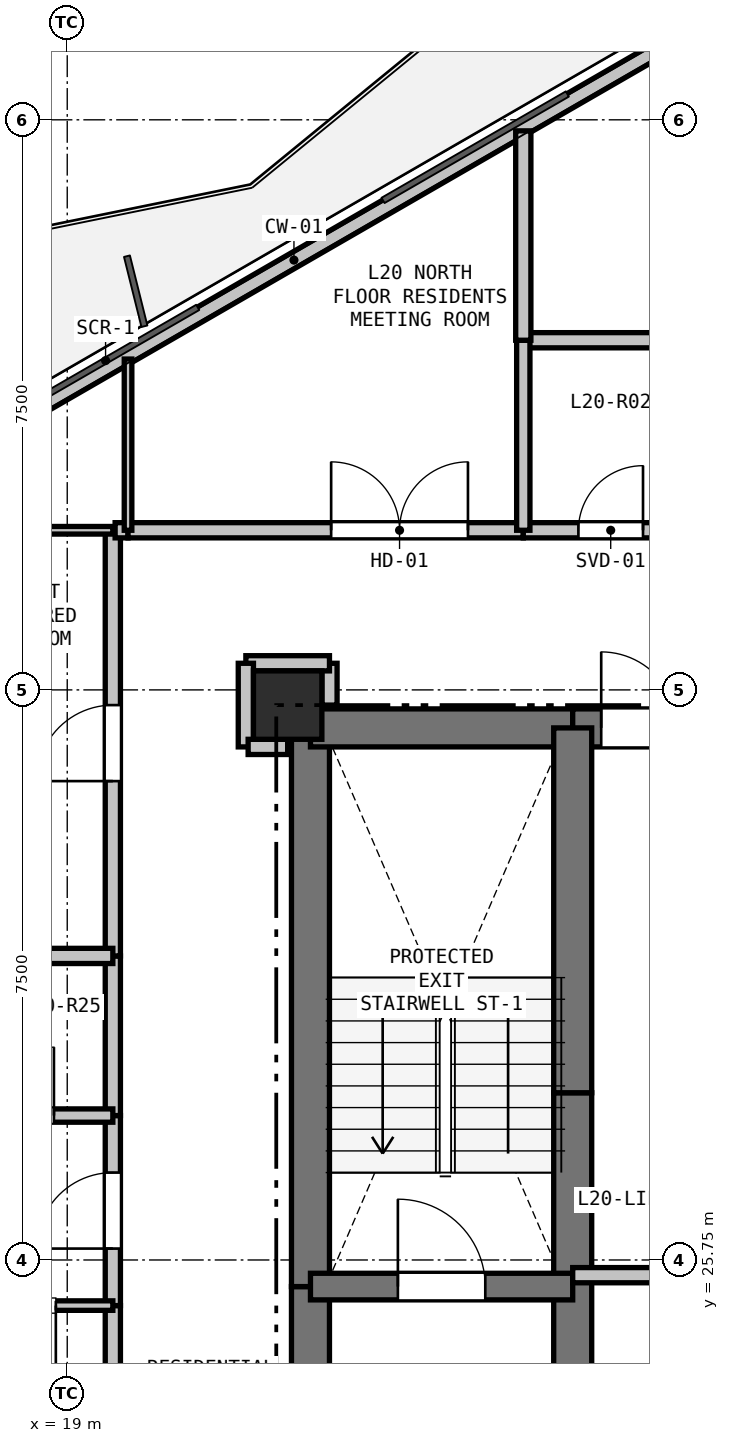
"""IFC4 building model, lengths in metres.
Left out: names, types, materials, properties, quantities, classifications, styles, units other than length and angle.
Written with IfcOpenShell. Run it as: python <this file> out.ifc"""

import sys

from ifc_helpers import new_model, si_unit, direction, frame, frame_2d, origin, origin_2d, place, context, subcontext, project, spatial, rectangle, extrude, element, fill, save


model = new_model("IFC4")
c1 = context("Model", 3, precision=1e-05, world=origin(), true_north=direction((0.0, 1.0)))
c2 = subcontext(c1, "Body", "Model", "MODEL_VIEW")
j1 = project(units=[si_unit("LENGTHUNIT", "METRE"), si_unit("PLANEANGLEUNIT", "RADIAN")], contexts=[c1])
p1 = place(None, origin())
s1 = spatial("IfcSite", under=j1, at=p1, CompositionType="ELEMENT")
p2 = place(p1, origin())
s2 = spatial("IfcBuilding", under=s1, at=p2, CompositionType="ELEMENT")
p3 = place(p2, frame((0.0, 0.0, 76.8)))
s3 = spatial("IfcBuildingStorey", under=s2, at=p3, CompositionType="ELEMENT", Elevation=76.8)
p4 = place(p3, frame((21.9, 33.05, 0.0), z_axis=(0.0, 0.0, 1.0), x_axis=(1.0, 0.0, 0.0)))
e1 = element("IfcColumn", 1, at=p4, inside=s3, PredefinedType="COLUMN", context=c2, shape_type="SweptSolid", body=[
    extrude(rectangle(XDim=0.9, YDim=0.9, at=origin_2d()), origin(), (0.0, 0.0, 1.0), 3.3),
])
p5 = place(p3, frame((17.12, 36.097, 0.0), z_axis=(0.0, 0.0, 1.0), x_axis=(0.866027010039, 0.499997217876, 0.0)))
e2 = element("IfcWall", 2, at=p5, inside=s3, PredefinedType="PARAPET", context=c2, shape_type="SweptSolid", body=[
    extrude(rectangle(XDim=11.229, YDim=0.2, at=frame_2d((5.615, 0.0))), origin(), (0.0, 0.0, 1.0), 0.2),
])
p6 = place(p3, frame((22.2, 20.75, 0.0), z_axis=(0.0, 0.0, 1.0), x_axis=(0.0, 1.0, 0.0)))
e3 = element("IfcWall", 3, at=p6, inside=s3, PredefinedType="SHEAR", context=c2, shape_type="SweptSolid", body=[
    extrude(rectangle(XDim=4.65, YDim=0.5, at=frame_2d((2.325, 0.0))), origin(), (0.0, 0.0, 1.0), 3.05),
])
p7 = place(p3, frame((22.2, 25.4, 0.0), z_axis=(0.0, 0.0, 1.0), x_axis=(0.0, 1.0, 0.0)))
e4 = element("IfcWall", 4, at=p7, inside=s3, PredefinedType="SHEAR", context=c2, shape_type="SweptSolid", body=[
    extrude(rectangle(XDim=7.35, YDim=0.5, at=frame_2d((3.675, 0.0))), origin(), (0.0, 0.0, 1.0), 3.05),
])
p8 = place(p3, frame((22.2, 32.75, 0.0), z_axis=(0.0, 0.0, 1.0), x_axis=(1.0, 0.0, 0.0)))
e5 = element("IfcWall", 5, at=p8, inside=s3, PredefinedType="SHEAR", context=c2, shape_type="SweptSolid", body=[
    extrude(rectangle(XDim=3.45, YDim=0.5, at=frame_2d((1.725, 0.0))), origin(), (0.0, 0.0, 1.0), 3.05),
])
p9 = place(p3, frame((25.65, 32.75, 0.0), z_axis=(0.0, 0.0, 1.0), x_axis=(1.0, 0.0, 0.0)))
e6 = element("IfcWall", 6, at=p9, inside=s3, PredefinedType="SHEAR", context=c2, shape_type="SweptSolid", body=[
    extrude(rectangle(XDim=1.75, YDim=0.5, at=frame_2d((0.875, 0.0))), origin(), (0.0, 0.0, 1.0), 3.05),
])
p10 = place(p9, frame((0.375, 0.0, 0.0)))
e7 = element("IfcOpeningElement", 7, at=p10, cuts=e6, PredefinedType="OPENING", context=c2, shape_type="SweptSolid", body=[
    extrude(rectangle(XDim=1.0, YDim=2.15, at=frame_2d((0.5, 1.075))), frame((0.0, 0.26, 0.0), z_axis=(0.0, -1.0, 0.0), x_axis=(1.0, 0.0, 0.0)), (0.0, 0.0, 1.0), 0.52),
])
p11 = place(p3, frame((25.65, 22.75, 0.0), z_axis=(0.0, 0.0, 1.0), x_axis=(0.0, 1.0, 0.0)))
e8 = element("IfcWall", 8, at=p11, inside=s3, PredefinedType="SHEAR", context=c2, shape_type="SweptSolid", body=[
    extrude(rectangle(XDim=2.8, YDim=0.5, at=frame_2d((1.4, 0.0))), origin(), (0.0, 0.0, 1.0), 3.05),
])
p12 = place(p3, frame((25.65, 25.55, 0.0), z_axis=(0.0, 0.0, 1.0), x_axis=(0.0, 1.0, 0.0)))
e9 = element("IfcWall", 9, at=p12, inside=s3, PredefinedType="SHEAR", context=c2, shape_type="SweptSolid", body=[
    extrude(rectangle(XDim=2.4, YDim=0.5, at=frame_2d((1.2, 0.0))), origin(), (0.0, 0.0, 1.0), 3.05),
])
p13 = place(p3, frame((25.65, 27.95, 0.0), z_axis=(0.0, 0.0, 1.0), x_axis=(0.0, 1.0, 0.0)))
e10 = element("IfcWall", 10, at=p13, inside=s3, PredefinedType="SHEAR", context=c2, shape_type="SweptSolid", body=[
    extrude(rectangle(XDim=4.8, YDim=0.5, at=frame_2d((2.4, 0.0))), origin(), (0.0, 0.0, 1.0), 3.05),
])
p14 = place(p3, frame((22.2, 25.4, 0.0), z_axis=(0.0, 0.0, 1.0), x_axis=(1.0, 0.0, 0.0)))
e11 = element("IfcWall", 11, at=p14, inside=s3, PredefinedType="SHEAR", context=c2, shape_type="SweptSolid", body=[
    extrude(rectangle(XDim=3.45, YDim=0.35, at=frame_2d((1.725, 0.0))), origin(), (0.0, 0.0, 1.0), 3.05),
])
p15 = place(p14, frame((1.15, 0.0, 0.0)))
e12 = element("IfcOpeningElement", 12, at=p15, cuts=e11, PredefinedType="OPENING", context=c2, shape_type="SweptSolid", body=[
    extrude(rectangle(XDim=1.15, YDim=2.15, at=frame_2d((0.575, 1.075))), frame((0.0, 0.185, 0.0), z_axis=(0.0, -1.0, 0.0), x_axis=(1.0, 0.0, 0.0)), (0.0, 0.0, 1.0), 0.37),
])
p16 = place(p3, frame((25.65, 25.55, 0.0), z_axis=(0.0, 0.0, 1.0), x_axis=(1.0, 0.0, 0.0)))
e13 = element("IfcWall", 13, at=p16, inside=s3, PredefinedType="PARTITIONING", context=c2, shape_type="SweptSolid", body=[
    extrude(rectangle(XDim=4.95, YDim=0.2, at=frame_2d((2.475, 0.0))), origin(), (0.0, 0.0, 1.0), 3.05),
])
p17 = place(p3, frame((19.6, 21.15, 0.0), z_axis=(0.0, 0.0, 1.0), x_axis=(0.0, 1.0, 0.0)))
e14 = element("IfcWall", 14, at=p17, inside=s3, PredefinedType="PARTITIONING", context=c2, shape_type="SweptSolid", body=[
    extrude(rectangle(XDim=4.0, YDim=0.2, at=frame_2d((2.0, 0.0))), origin(), (0.0, 0.0, 1.0), 2.423),
])
p18 = place(p3, frame((19.6, 25.15, 0.0), z_axis=(0.0, 0.0, 1.0), x_axis=(0.0, 1.0, 0.0)))
e15 = element("IfcWall", 15, at=p18, inside=s3, PredefinedType="PARTITIONING", context=c2, shape_type="SweptSolid", body=[
    extrude(rectangle(XDim=2.5, YDim=0.2, at=frame_2d((1.25, 0.0))), origin(), (0.0, 0.0, 1.0), 3.05),
])
p19 = place(p18, frame((0.75, 0.0, 0.0)))
e16 = element("IfcOpeningElement", 16, at=p19, cuts=e15, PredefinedType="OPENING", context=c2, shape_type="SweptSolid", body=[
    extrude(rectangle(XDim=1.0, YDim=2.15, at=frame_2d((0.5, 1.075))), frame((0.0, 0.11, 0.0), z_axis=(0.0, -1.0, 0.0), x_axis=(1.0, 0.0, 0.0)), (0.0, 0.0, 1.0), 0.22),
])
p20 = place(p3, frame((19.6, 27.65, 0.0), z_axis=(0.0, 0.0, 1.0), x_axis=(0.0, 1.0, 0.0)))
e17 = element("IfcWall", 17, at=p20, inside=s3, PredefinedType="PARTITIONING", context=c2, shape_type="SweptSolid", body=[
    extrude(rectangle(XDim=2.1, YDim=0.2, at=frame_2d((1.05, 0.0))), origin(), (0.0, 0.0, 1.0), 3.05),
])
p21 = place(p3, frame((19.6, 29.75, 0.0), z_axis=(0.0, 0.0, 1.0), x_axis=(0.0, 1.0, 0.0)))
e18 = element("IfcWall", 18, at=p21, inside=s3, PredefinedType="PARTITIONING", context=c2, shape_type="SweptSolid", body=[
    extrude(rectangle(XDim=5.6, YDim=0.2, at=frame_2d((2.8, 0.0))), origin(), (0.0, 0.0, 1.0), 2.423),
])
p22 = place(p21, frame((2.3, 0.0, 0.0)))
e19 = element("IfcOpeningElement", 19, at=p22, cuts=e18, PredefinedType="OPENING", context=c2, shape_type="SweptSolid", body=[
    extrude(rectangle(XDim=1.0, YDim=2.15, at=frame_2d((0.5, 1.075))), frame((0.0, 0.11, 0.0), z_axis=(0.0, -1.0, 0.0), x_axis=(1.0, 0.0, 0.0)), (0.0, 0.0, 1.0), 0.22),
])
p23 = place(p3, frame((19.63, 35.35, 0.0), z_axis=(0.0, 0.0, 1.0), x_axis=(1.0, 0.0, 0.0)))
e20 = element("IfcWall", 20, at=p23, inside=s3, PredefinedType="PARTITIONING", context=c2, shape_type="SweptSolid", body=[
    extrude(rectangle(XDim=0.17, YDim=0.2, at=frame_2d((0.085, 0.0))), origin(), (0.0, 0.0, 1.0), 3.05),
])
p24 = place(p3, frame((19.8, 35.35, 0.0), z_axis=(0.0, 0.0, 1.0), x_axis=(1.0, 0.0, 0.0)))
e21 = element("IfcWall", 21, at=p24, inside=s3, PredefinedType="PARTITIONING", context=c2, shape_type="SweptSolid", body=[
    extrude(rectangle(XDim=5.2, YDim=0.2, at=frame_2d((2.6, 0.0))), origin(), (0.0, 0.0, 1.0), 3.05),
])
p25 = place(p24, frame((2.672, 0.0, 0.0)))
e22 = element("IfcOpeningElement", 22, at=p25, cuts=e21, PredefinedType="OPENING", context=c2, shape_type="SweptSolid", body=[
    extrude(rectangle(XDim=1.8, YDim=2.2, at=frame_2d((0.9, 1.1))), frame((0.0, 0.11, 0.0), z_axis=(0.0, -1.0, 0.0), x_axis=(1.0, 0.0, 0.0)), (0.0, 0.0, 1.0), 0.22),
])
p26 = place(p3, frame((25.0, 35.35, 0.0), z_axis=(0.0, 0.0, 1.0), x_axis=(1.0, 0.0, 0.0)))
e23 = element("IfcWall", 23, at=p26, inside=s3, PredefinedType="PARTITIONING", context=c2, shape_type="SweptSolid", body=[
    extrude(rectangle(XDim=2.3, YDim=0.2, at=frame_2d((1.15, 0.0))), origin(), (0.0, 0.0, 1.0), 3.05),
])
p27 = place(p26, frame((0.725, 0.0, 0.0)))
e24 = element("IfcOpeningElement", 24, at=p27, cuts=e23, PredefinedType="OPENING", context=c2, shape_type="SweptSolid", body=[
    extrude(rectangle(XDim=0.85, YDim=2.1, at=frame_2d((0.425, 1.05))), frame((0.0, 0.11, 0.0), z_axis=(0.0, -1.0, 0.0), x_axis=(1.0, 0.0, 0.0)), (0.0, 0.0, 1.0), 0.22),
])
p28 = place(p3, frame((22.45, 33.05, 0.0), z_axis=(0.0, 0.0, 1.0), x_axis=(0.0, 1.0, 0.0)))
e25 = element("IfcWall", 25, at=p28, inside=s3, PredefinedType="PARTITIONING", context=c2, shape_type="SweptSolid", body=[
    extrude(rectangle(XDim=0.55, YDim=0.2, at=frame_2d((0.275, 0.0))), origin(), (0.0, 0.0, 1.0), 2.498),
])
p29 = place(p3, frame((22.45, 33.6, 0.0), z_axis=(0.0, 0.0, 1.0), x_axis=(-1.0, 0.0, 0.0)))
e26 = element("IfcWall", 26, at=p29, inside=s3, PredefinedType="PARTITIONING", context=c2, shape_type="SweptSolid", body=[
    extrude(rectangle(XDim=1.1, YDim=0.2, at=frame_2d((0.55, 0.0))), origin(), (0.0, 0.0, 1.0), 3.05),
])
p30 = place(p3, frame((21.35, 33.6, 0.0), z_axis=(0.0, 0.0, 1.0), x_axis=(0.0, -1.0, 0.0)))
e27 = element("IfcWall", 27, at=p30, inside=s3, PredefinedType="PARTITIONING", context=c2, shape_type="SweptSolid", body=[
    extrude(rectangle(XDim=1.1, YDim=0.2, at=frame_2d((0.55, 0.0))), origin(), (0.0, 0.0, 1.0), 2.423),
])
p31 = place(p3, frame((21.38, 32.5, 0.0), z_axis=(0.0, 0.0, 1.0), x_axis=(1.0, 0.0, 0.0)))
e28 = element("IfcWall", 28, at=p31, inside=s3, PredefinedType="PARTITIONING", context=c2, shape_type="SweptSolid", body=[
    extrude(rectangle(XDim=0.52, YDim=0.2, at=frame_2d((0.26, 0.0))), origin(), (0.0, 0.0, 1.0), 2.498),
])
p32 = place(p3, frame((17.15, 27.65, 0.0), z_axis=(0.0, 0.0, 1.0), x_axis=(1.0, 0.0, 0.0)))
e29 = element("IfcWall", 29, at=p32, inside=s3, PredefinedType="PLUMBINGWALL", context=c2, shape_type="SweptSolid", body=[
    extrude(rectangle(XDim=2.45, YDim=0.175, at=frame_2d((1.225, 0.0))), origin(), (0.0, 0.0, 1.0), 3.05),
])
p33 = place(p32, frame((0.775, 0.0, 0.0)))
e30 = element("IfcOpeningElement", 30, at=p33, cuts=e29, PredefinedType="OPENING", context=c2, shape_type="SweptSolid", body=[
    extrude(rectangle(XDim=0.9, YDim=2.1, at=frame_2d((0.45, 1.05))), frame((0.0, 0.097, 0.0), z_axis=(0.0, -1.0, 0.0), x_axis=(1.0, 0.0, 0.0)), (0.0, 0.0, 1.0), 0.195),
])
p34 = place(p3, frame((19.6, 25.15, 0.0), z_axis=(0.0, 0.0, 1.0), x_axis=(-1.0, 0.0, 0.0)))
e31 = element("IfcWall", 31, at=p34, inside=s3, PredefinedType="PARTITIONING", context=c2, shape_type="SweptSolid", body=[
    extrude(rectangle(XDim=2.45, YDim=0.125, at=frame_2d((1.225, 0.0))), origin(), (0.0, 0.0, 1.0), 3.05),
])
p35 = place(p34, frame((0.75, 0.0, 0.0)))
e32 = element("IfcOpeningElement", 32, at=p35, cuts=e31, PredefinedType="OPENING", context=c2, shape_type="SweptSolid", body=[
    extrude(rectangle(XDim=0.95, YDim=2.1, at=frame_2d((0.475, 1.05))), frame((0.0, 0.073, 0.0), z_axis=(0.0, -1.0, 0.0), x_axis=(1.0, 0.0, 0.0)), (0.0, 0.0, 1.0), 0.145),
])
p36 = place(p3, frame((25.0, 37.85, 0.0), z_axis=(0.0, 0.0, 1.0), x_axis=(1.0, 0.0, 0.0)))
e33 = element("IfcWall", 33, at=p36, inside=s3, PredefinedType="PARTITIONING", context=c2, shape_type="SweptSolid", body=[
    extrude(rectangle(XDim=2.3, YDim=0.2, at=frame_2d((1.15, 0.0))), origin(), (0.0, 0.0, 1.0), 3.05),
])
p37 = place(p3, frame((25.0, 35.35, 0.0), z_axis=(0.0, 0.0, 1.0), x_axis=(0.0, 1.0, 0.0)))
e34 = element("IfcWall", 34, at=p37, inside=s3, PredefinedType="PLUMBINGWALL", context=c2, shape_type="SweptSolid", body=[
    extrude(rectangle(XDim=2.5, YDim=0.175, at=frame_2d((1.25, 0.0))), origin(), (0.0, 0.0, 1.0), 3.05),
])
p38 = place(p3, frame((17.15, 29.75, 0.0), z_axis=(0.0, 0.0, 1.0), x_axis=(1.0, 0.0, 0.0)))
e35 = element("IfcWall", 35, at=p38, inside=s3, PredefinedType="PARTITIONING", context=c2, shape_type="SweptSolid", body=[
    extrude(rectangle(XDim=2.45, YDim=0.2, at=frame_2d((1.225, 0.0))), origin(), (0.0, 0.0, 1.0), 3.05),
])
p39 = place(p3, frame((25.0, 40.605, 0.0), z_axis=(0.0, 0.0, 1.0), x_axis=(0.0, -1.0, 0.0)))
e36 = element("IfcWall", 36, at=p39, inside=s3, PredefinedType="PARTITIONING", context=c2, shape_type="SweptSolid", body=[
    extrude(rectangle(XDim=2.755, YDim=0.2, at=frame_2d((1.377, 0.0))), origin(), (0.0, 0.0, 1.0), 2.365),
])
p40 = place(p3, frame((19.8, 35.35, 0.0), z_axis=(0.0, 0.0, 1.0), x_axis=(0.0, 1.0, 0.0)))
e37 = element("IfcWall", 37, at=p40, inside=s3, PredefinedType="PARTITIONING", context=c2, shape_type="SweptSolid", body=[
    extrude(rectangle(XDim=2.252, YDim=0.1, at=frame_2d((1.126, 0.0))), origin(), (0.0, 0.0, 1.0), 2.365),
])
p41 = place(p3, frame((17.15, 35.35, 0.0), z_axis=(0.0, 0.0, 1.0), x_axis=(1.0, 0.0, 0.0)))
e38 = element("IfcWall", 38, at=p41, inside=s3, PredefinedType="PARTITIONING", context=c2, shape_type="SweptSolid", body=[
    extrude(rectangle(XDim=2.45, YDim=0.1, at=frame_2d((1.225, 0.0))), origin(), (0.0, 0.0, 1.0), 2.365),
])
p42 = place(p10, origin())
e39 = element("IfcDoor", 39, at=p42, inside=s3, OperationType="SINGLE_SWING_LEFT", PredefinedType="DOOR", context=c2, shape_type="SweptSolid", body=[
    extrude(rectangle(XDim=1.0, YDim=2.15, at=frame_2d((0.5, 1.075))), frame((0.0, 0.025, 0.0), z_axis=(0.0, -1.0, 0.0), x_axis=(1.0, 0.0, 0.0)), (0.0, 0.0, 1.0), 0.05),
])
fill(e7, e39)
p43 = place(p15, origin())
e40 = element("IfcDoor", 40, at=p43, inside=s3, OperationType="SINGLE_SWING_LEFT", PredefinedType="DOOR", context=c2, shape_type="SweptSolid", body=[
    extrude(rectangle(XDim=1.15, YDim=2.15, at=frame_2d((0.575, 1.075))), frame((0.0, 0.025, 0.0), z_axis=(0.0, -1.0, 0.0), x_axis=(1.0, 0.0, 0.0)), (0.0, 0.0, 1.0), 0.05),
])
fill(e12, e40)
p44 = place(p19, origin())
e41 = element("IfcDoor", 41, at=p44, inside=s3, OperationType="SINGLE_SWING_LEFT", PredefinedType="DOOR", context=c2, shape_type="SweptSolid", body=[
    extrude(rectangle(XDim=1.0, YDim=2.15, at=frame_2d((0.5, 1.075))), frame((0.0, 0.025, 0.0), z_axis=(0.0, -1.0, 0.0), x_axis=(1.0, 0.0, 0.0)), (0.0, 0.0, 1.0), 0.05),
])
fill(e16, e41)
p45 = place(p27, origin())
e42 = element("IfcDoor", 42, at=p45, inside=s3, OperationType="SINGLE_SWING_RIGHT", PredefinedType="DOOR", context=c2, shape_type="SweptSolid", body=[
    extrude(rectangle(XDim=0.85, YDim=2.1, at=frame_2d((0.425, 1.05))), frame((0.0, 0.025, 0.0), z_axis=(0.0, -1.0, 0.0), x_axis=(1.0, 0.0, 0.0)), (0.0, 0.0, 1.0), 0.05),
])
fill(e24, e42)
p46 = place(p25, origin())
e43 = element("IfcDoor", 43, at=p46, inside=s3, OperationType="DOUBLE_DOOR_SINGLE_SWING", PredefinedType="DOOR", context=c2, shape_type="SweptSolid", body=[
    extrude(rectangle(XDim=1.8, YDim=2.2, at=frame_2d((0.9, 1.1))), frame((0.0, 0.025, 0.0), z_axis=(0.0, -1.0, 0.0), x_axis=(1.0, 0.0, 0.0)), (0.0, 0.0, 1.0), 0.05),
])
fill(e22, e43)
p47 = place(p22, origin())
e44 = element("IfcDoor", 44, at=p47, inside=s3, OperationType="SINGLE_SWING_LEFT", PredefinedType="DOOR", context=c2, shape_type="SweptSolid", body=[
    extrude(rectangle(XDim=1.0, YDim=2.15, at=frame_2d((0.5, 1.075))), frame((0.0, 0.025, 0.0), z_axis=(0.0, -1.0, 0.0), x_axis=(1.0, 0.0, 0.0)), (0.0, 0.0, 1.0), 0.05),
])
fill(e19, e44)
p48 = place(p33, origin())
e45 = element("IfcDoor", 45, at=p48, inside=s3, OperationType="SINGLE_SWING_RIGHT", PredefinedType="DOOR", context=c2, shape_type="SweptSolid", body=[
    extrude(rectangle(XDim=0.9, YDim=2.1, at=frame_2d((0.45, 1.05))), frame((0.0, 0.025, 0.0), z_axis=(0.0, -1.0, 0.0), x_axis=(1.0, 0.0, 0.0)), (0.0, 0.0, 1.0), 0.05),
])
fill(e30, e45)
p49 = place(p35, origin())
e46 = element("IfcDoor", 46, at=p49, inside=s3, OperationType="SINGLE_SWING_LEFT", PredefinedType="DOOR", context=c2, shape_type="SweptSolid", body=[
    extrude(rectangle(XDim=0.95, YDim=2.1, at=frame_2d((0.475, 1.05))), frame((0.0, 0.025, 0.0), z_axis=(0.0, -1.0, 0.0), x_axis=(1.0, 0.0, 0.0)), (0.0, 0.0, 1.0), 0.05),
])
fill(e32, e46)
save(model, sys.argv[1])
